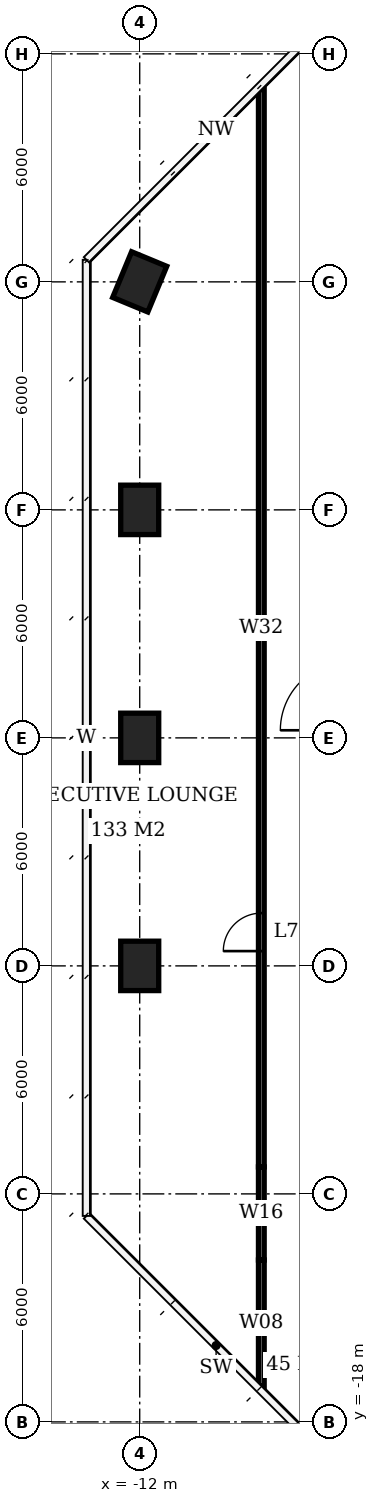
"""IFC4 building model, lengths in metres.
Left out: names, types, materials, properties, quantities, classifications, styles, units other than length and angle.
Written with IfcOpenShell. Run it as: python <this file> out.ifc"""

import sys

from ifc_helpers import new_model, si_unit, direction, frame, frame_2d, origin, origin_2d, place, context, subcontext, project, spatial, rectangle, extrude, element, fill, save


model = new_model("IFC4")
c1 = context("Model", 3, precision=1e-05, world=origin(), true_north=direction((0.0, 1.0)))
c2 = subcontext(c1, "Body", "Model", "MODEL_VIEW")
j1 = project(units=[si_unit("LENGTHUNIT", "METRE"), si_unit("PLANEANGLEUNIT", "RADIAN")], contexts=[c1])
p1 = place(None, origin())
s1 = spatial("IfcSite", under=j1, at=p1, CompositionType="ELEMENT")
p2 = place(p1, origin())
s2 = spatial("IfcBuilding", under=s1, at=p2, CompositionType="ELEMENT")
p3 = place(p2, frame((0.0, 0.0, 284.0)))
s3 = spatial("IfcBuildingStorey", under=s2, at=p3, CompositionType="ELEMENT", Elevation=284.0)
for number, where, z_axis, x_axis in (
    (1, (-12.0, -6.0, 0.0), (0.0, 0.0, 1.0), (0.0, 1.0, 0.0)),
    (2, (-12.0, 0.0, 0.0), (0.0, 0.0, 1.0), (0.0, 1.0, 0.0)),
    (3, (-12.0, 6.0, 0.0), (0.0, 0.0, 1.0), (0.0, 1.0, 0.0)),
    (4, (-12.0, 12.0, 0.0), (0.0, 0.0, 1.0), (0.383, 0.924, 0.0)),
):
    element("IfcColumn", number, at=place(p3, frame(where, z_axis=z_axis, x_axis=x_axis)), inside=s3, PredefinedType="COLUMN", context=c2, shape_type="SweptSolid", body=[
        extrude(rectangle(XDim=1.3, YDim=1.0, at=origin_2d()), origin(), (0.0, 0.0, 1.0), 3.9),
    ])
p4 = place(p3, frame((-8.8, -17.063, 0.0), z_axis=(0.0, 0.0, 1.0), x_axis=(0.0, 1.0, 0.0)))
e5 = element("IfcWall", 5, at=p4, inside=s3, PredefinedType="PARTITIONING", context=c2, shape_type="SweptSolid", body=[
    extrude(rectangle(XDim=3.323, YDim=0.15, at=frame_2d((1.662, 0.0))), origin(), (0.0, 0.0, 1.0), 3.65),
])
p5 = place(p3, frame((-8.8, -13.74, 0.0), z_axis=(0.0, 0.0, 1.0), x_axis=(0.0, 1.0, 0.0)))
e6 = element("IfcWall", 6, at=p5, inside=s3, PredefinedType="PARTITIONING", context=c2, shape_type="SweptSolid", body=[
    extrude(rectangle(XDim=2.45, YDim=0.15, at=frame_2d((1.225, 0.0))), origin(), (0.0, 0.0, 1.0), 2.65),
])
p6 = place(p3, frame((-8.8, -11.29, 0.0), z_axis=(0.0, 0.0, 1.0), x_axis=(0.0, 1.0, 0.0)))
e7 = element("IfcWall", 7, at=p6, inside=s3, PredefinedType="PARTITIONING", context=c2, shape_type="SweptSolid", body=[
    extrude(rectangle(XDim=28.353, YDim=0.15, at=frame_2d((14.177, 0.0))), origin(), (0.0, 0.0, 1.0), 3.65),
])
p7 = place(p6, frame((5.679, 0.0, 0.0)))
e8 = element("IfcOpeningElement", 8, at=p7, cuts=e7, PredefinedType="OPENING", context=c2, shape_type="SweptSolid", body=[
    extrude(rectangle(XDim=1.0, YDim=2.4, at=frame_2d((0.5, 1.2))), frame((0.0, 0.085, 0.0), z_axis=(0.0, -1.0, 0.0), x_axis=(1.0, 0.0, 0.0)), (0.0, 0.0, 1.0), 0.17),
])
p8 = place(p7, origin())
e9 = element("IfcDoor", 9, at=p8, inside=s3, OperationType="SINGLE_SWING_LEFT", PredefinedType="DOOR", context=c2, shape_type="SweptSolid", body=[
    extrude(rectangle(XDim=1.0, YDim=2.4, at=frame_2d((0.5, 1.2))), frame((0.0, 0.025, 0.0), z_axis=(0.0, -1.0, 0.0), x_axis=(1.0, 0.0, 0.0)), (0.0, 0.0, 1.0), 0.05),
])
fill(e8, e9)
save(model, sys.argv[1])
